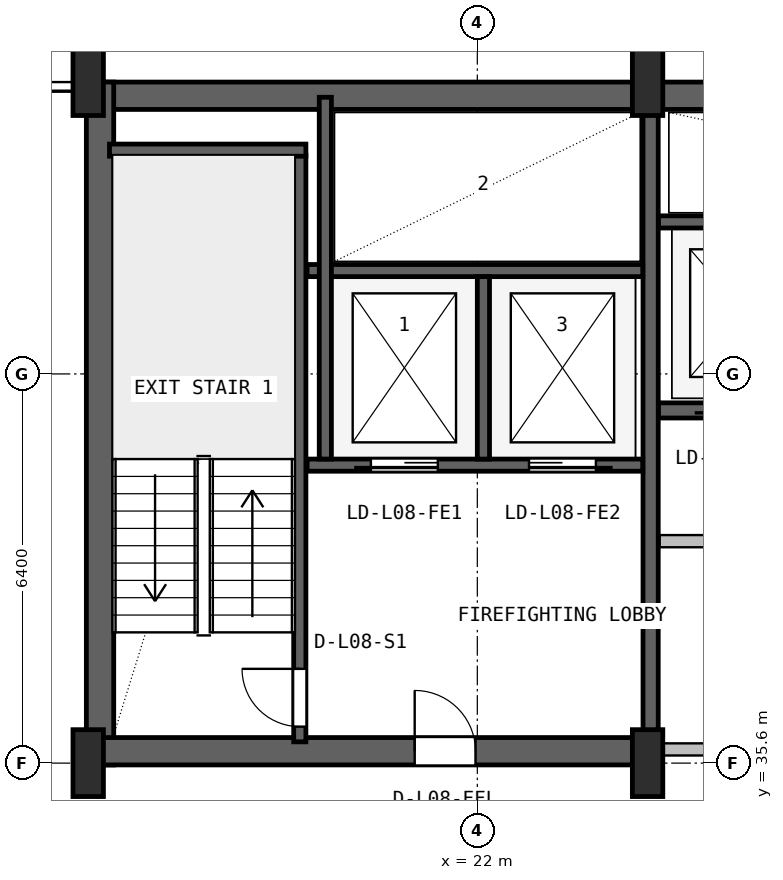
"""IFC4 building model, lengths in metres.
Left out: names, types, materials, properties, quantities, classifications, styles, units other than length and angle.
Written with IfcOpenShell. Run it as: python <this file> out.ifc"""

import sys

from ifc_helpers import new_model, si_unit, direction, frame, frame_2d, origin, origin_2d, place, context, subcontext, project, spatial, rectangle, i_section, extrude, source, transform, mapped, element, fill, save


model = new_model("IFC4")
c1 = context("Model", 3, precision=1e-05, world=origin(), true_north=direction((0.0, 1.0)))
c2 = subcontext(c1, "Body", "Model", "MODEL_VIEW")
j1 = project(units=[si_unit("LENGTHUNIT", "METRE"), si_unit("PLANEANGLEUNIT", "RADIAN")], contexts=[c1])
p1 = place(None, origin())
s1 = spatial("IfcSite", under=j1, at=p1, CompositionType="ELEMENT")
p2 = place(p1, origin())
s2 = spatial("IfcBuilding", under=s1, at=p2, CompositionType="ELEMENT")
p3 = place(p2, frame((0.0, 0.0, 39.3)))
s3 = spatial("IfcBuildingStorey", under=s2, at=p3, CompositionType="ELEMENT", Elevation=39.3)
p4 = place(p3, frame((15.6, 46.575, 0.0), z_axis=(0.0, 0.0, 1.0), x_axis=(1.0, 0.0, 0.0)))
e1 = element("IfcWall", 1, at=p4, inside=s3, PredefinedType="SHEAR", context=c2, shape_type="SweptSolid", body=[
    extrude(rectangle(XDim=36.8, YDim=0.45, at=frame_2d((18.4, 0.0))), origin(), (0.0, 0.0, 1.0), 3.65),
])
p5 = place(p3, frame((15.795, 35.57, 0.0), z_axis=(0.0, 0.0, 1.0), x_axis=(0.0, 1.0, 0.0)))
e2 = element("IfcWall", 2, at=p5, inside=s3, PredefinedType="SHEAR", context=c2, shape_type="SweptSolid", body=[
    extrude(rectangle(XDim=11.23, YDim=0.45, at=frame_2d((5.615, 0.0))), origin(), (0.0, 0.0, 1.0), 3.65),
])
p6 = place(p3, frame((15.57, 35.795, 0.0), z_axis=(0.0, 0.0, 1.0), x_axis=(1.0, 0.0, 0.0)))
e3 = element("IfcWall", 3, at=p6, inside=s3, PredefinedType="SHEAR", context=c2, shape_type="SweptSolid", body=[
    extrude(rectangle(XDim=9.23, YDim=0.45, at=frame_2d((4.615, 0.0))), origin(), (0.0, 0.0, 1.0), 3.65),
])
p7 = place(p6, frame((5.4, 0.0, 0.0)))
e4 = element("IfcOpeningElement", 4, at=p7, cuts=e3, PredefinedType="OPENING", context=c2, shape_type="SweptSolid", body=[
    extrude(rectangle(XDim=1.0, YDim=2.1, at=frame_2d((0.5, 1.05))), frame((0.0, 0.235, 0.0), z_axis=(0.0, -1.0, 0.0), x_axis=(1.0, 0.0, 0.0)), (0.0, 0.0, 1.0), 0.47),
])
m1 = source(origin(), c2, "Body", "SweptSolid", [
    extrude(i_section(OverallWidth=0.5, OverallDepth=1.1, WebThickness=0.018, FlangeThickness=0.032, FilletRadius=0.018, at=origin_2d()), origin(), (0.0, 0.0, 1.0), 3.9),
])
for number, where, z_axis, x_axis in (
    (5, (15.6, 35.6, 0.0), (0.0, 0.0, 1.0), (1.0, 0.0, 0.0)),
    (6, (15.6, 46.8, 0.0), (0.0, 0.0, 1.0), (1.0, 0.0, 0.0)),
    (7, (24.8, 35.6, 0.0), (0.0, 0.0, 1.0), (1.0, 0.0, 0.0)),
    (8, (24.8, 46.8, 0.0), (0.0, 0.0, 1.0), (1.0, 0.0, 0.0)),
):
    element("IfcColumn", number, at=place(p3, frame(where, z_axis=z_axis, x_axis=x_axis)), inside=s3, PredefinedType="COLUMN", context=c2, shape_type="MappedRepresentation", body=[
        mapped(m1, transform((0.0, 0.0, 0.0), x_axis=(1.0, 0.0, 0.0), y_axis=(0.0, 1.0, 0.0), z_axis=(0.0, 0.0, 1.0), scale=1.0)),
    ])
p8 = place(p3, frame((19.08, 35.95, 0.0), z_axis=(0.0, 0.0, 1.0), x_axis=(0.0, 1.0, 0.0)))
e9 = element("IfcWall", 9, at=p8, inside=s3, PredefinedType="SHEAR", context=c2, shape_type="SweptSolid", body=[
    extrude(rectangle(XDim=9.65, YDim=0.2, at=frame_2d((4.825, 0.0))), origin(), (0.0, 0.0, 1.0), 3.65),
])
p9 = place(p8, frame((0.25, 0.0, 0.0)))
e10 = element("IfcOpeningElement", 10, at=p9, cuts=e9, PredefinedType="OPENING", context=c2, shape_type="SweptSolid", body=[
    extrude(rectangle(XDim=0.95, YDim=2.1, at=frame_2d((0.475, 1.05))), frame((0.0, 0.11, 0.0), z_axis=(0.0, -1.0, 0.0), x_axis=(1.0, 0.0, 0.0)), (0.0, 0.0, 1.0), 0.22),
])
p10 = place(p3, frame((15.95, 45.68, 0.0), z_axis=(0.0, 0.0, 1.0), x_axis=(1.0, 0.0, 0.0)))
e11 = element("IfcWall", 11, at=p10, inside=s3, PredefinedType="SHEAR", context=c2, shape_type="SweptSolid", body=[
    extrude(rectangle(XDim=3.23, YDim=0.2, at=frame_2d((1.615, 0.0))), origin(), (0.0, 0.0, 1.0), 3.65),
])
p11 = place(p3, frame((24.85, 36.05, 0.0), z_axis=(0.0, 0.0, 1.0), x_axis=(0.0, 1.0, 0.0)))
e12 = element("IfcWall", 12, at=p11, inside=s3, PredefinedType="SHEAR", context=c2, shape_type="SweptSolid", body=[
    extrude(rectangle(XDim=10.45, YDim=0.25, at=frame_2d((5.225, 0.0))), origin(), (0.0, 0.0, 1.0), 3.65),
])
p12 = place(p3, frame((19.2, 40.5, 0.0), z_axis=(0.0, 0.0, 1.0), x_axis=(1.0, 0.0, 0.0)))
e13 = element("IfcWall", 13, at=p12, inside=s3, PredefinedType="SHEAR", context=c2, shape_type="SweptSolid", body=[
    extrude(rectangle(XDim=5.52, YDim=0.2, at=frame_2d((2.76, 0.0))), origin(), (0.0, 0.0, 1.0), 3.65),
])
p13 = place(p12, frame((1.05, 0.0, 0.0)))
e14 = element("IfcOpeningElement", 14, at=p13, cuts=e13, PredefinedType="OPENING", context=c2, shape_type="SweptSolid", body=[
    extrude(rectangle(XDim=1.1, YDim=2.18, at=frame_2d((0.55, 1.09))), frame((0.0, 0.11, 0.0), z_axis=(0.0, -1.0, 0.0), x_axis=(1.0, 0.0, 0.0)), (0.0, 0.0, 1.0), 0.22),
])
p14 = place(p12, frame((3.65, 0.0, 0.0)))
e15 = element("IfcOpeningElement", 15, at=p14, cuts=e13, PredefinedType="OPENING", context=c2, shape_type="SweptSolid", body=[
    extrude(rectangle(XDim=1.1, YDim=2.18, at=frame_2d((0.55, 1.09))), frame((0.0, 0.11, 0.0), z_axis=(0.0, -1.0, 0.0), x_axis=(1.0, 0.0, 0.0)), (0.0, 0.0, 1.0), 0.22),
])
p15 = place(p3, frame((19.2, 43.7, 0.0), z_axis=(0.0, 0.0, 1.0), x_axis=(1.0, 0.0, 0.0)))
e16 = element("IfcWall", 16, at=p15, inside=s3, PredefinedType="SHEAR", context=c2, shape_type="SweptSolid", body=[
    extrude(rectangle(XDim=5.52, YDim=0.2, at=frame_2d((2.76, 0.0))), origin(), (0.0, 0.0, 1.0), 3.65),
])
p16 = place(p3, frame((22.1, 40.6, 0.0), z_axis=(0.0, 0.0, 1.0), x_axis=(0.0, 1.0, 0.0)))
e17 = element("IfcWall", 17, at=p16, inside=s3, PredefinedType="SHEAR", context=c2, shape_type="SweptSolid", body=[
    extrude(rectangle(XDim=3.0, YDim=0.2, at=frame_2d((1.5, 0.0))), origin(), (0.0, 0.0, 1.0), 3.65),
])
p17 = place(p3, frame((19.5, 40.6, 0.0), z_axis=(0.0, 0.0, 1.0), x_axis=(0.0, 1.0, 0.0)))
e18 = element("IfcWall", 18, at=p17, inside=s3, PredefinedType="SHEAR", context=c2, shape_type="SweptSolid", body=[
    extrude(rectangle(XDim=5.95, YDim=0.2, at=frame_2d((2.975, 0.0))), origin(), (0.0, 0.0, 1.0), 3.65),
])
p18 = place(p3, frame((24.98, 41.4, 0.0), z_axis=(0.0, 0.0, 1.0), x_axis=(1.0, 0.0, 0.0)))
e19 = element("IfcWall", 19, at=p18, inside=s3, PredefinedType="SHEAR", context=c2, shape_type="SweptSolid", body=[
    extrude(rectangle(XDim=23.82, YDim=0.25, at=frame_2d((11.91, 0.0))), origin(), (0.0, 0.0, 1.0), 3.65),
])
p19 = place(p18, frame((0.87, 0.0, 0.0)))
e20 = element("IfcOpeningElement", 20, at=p19, cuts=e19, PredefinedType="OPENING", context=c2, shape_type="SweptSolid", body=[
    extrude(rectangle(XDim=1.1, YDim=2.18, at=frame_2d((0.55, 1.09))), frame((0.0, 0.135, 0.0), z_axis=(0.0, -1.0, 0.0), x_axis=(1.0, 0.0, 0.0)), (0.0, 0.0, 1.0), 0.27),
])
p20 = place(p18, frame((3.47, 0.0, 0.0)))
e21 = element("IfcOpeningElement", 21, at=p20, cuts=e19, PredefinedType="OPENING", context=c2, shape_type="SweptSolid", body=[
    extrude(rectangle(XDim=1.1, YDim=2.18, at=frame_2d((0.55, 1.09))), frame((0.0, 0.135, 0.0), z_axis=(0.0, -1.0, 0.0), x_axis=(1.0, 0.0, 0.0)), (0.0, 0.0, 1.0), 0.27),
])
p21 = place(p18, frame((6.07, 0.0, 0.0)))
e22 = element("IfcOpeningElement", 22, at=p21, cuts=e19, PredefinedType="OPENING", context=c2, shape_type="SweptSolid", body=[
    extrude(rectangle(XDim=1.1, YDim=2.18, at=frame_2d((0.55, 1.09))), frame((0.0, 0.135, 0.0), z_axis=(0.0, -1.0, 0.0), x_axis=(1.0, 0.0, 0.0)), (0.0, 0.0, 1.0), 0.27),
])
p22 = place(p3, frame((24.98, 44.5, 0.0), z_axis=(0.0, 0.0, 1.0), x_axis=(1.0, 0.0, 0.0)))
e23 = element("IfcWall", 23, at=p22, inside=s3, PredefinedType="SHEAR", context=c2, shape_type="SweptSolid", body=[
    extrude(rectangle(XDim=7.87, YDim=0.2, at=frame_2d((3.935, 0.0))), origin(), (0.0, 0.0, 1.0), 3.65),
])
p23 = place(p3, frame((25.0, 35.825, 0.0), z_axis=(0.0, 0.0, 1.0), x_axis=(1.0, 0.0, 0.0)))
e24 = element("IfcWall", 24, at=p23, inside=s3, PredefinedType="PLUMBINGWALL", context=c2, shape_type="SweptSolid", body=[
    extrude(rectangle(XDim=9.75, YDim=0.2, at=frame_2d((4.875, 0.0))), origin(), (0.0, 0.0, 1.0), 2.425),
])
p24 = place(p3, frame((25.0, 39.25, 0.0), z_axis=(0.0, 0.0, 1.0), x_axis=(1.0, 0.0, 0.0)))
e25 = element("IfcWall", 25, at=p24, inside=s3, PredefinedType="PLUMBINGWALL", context=c2, shape_type="SweptSolid", body=[
    extrude(rectangle(XDim=9.75, YDim=0.2, at=frame_2d((4.875, 0.0))), origin(), (0.0, 0.0, 1.0), 3.63),
])
p25 = place(p24, frame((1.75, 0.0, 0.0)))
e26 = element("IfcOpeningElement", 26, at=p25, cuts=e25, PredefinedType="OPENING", context=c2, shape_type="SweptSolid", body=[
    extrude(rectangle(XDim=0.9, YDim=2.06, at=frame_2d((0.45, 1.03))), frame((0.0, 0.11, 0.0), z_axis=(0.0, -1.0, 0.0), x_axis=(1.0, 0.0, 0.0)), (0.0, 0.0, 1.0), 0.22),
])
p26 = place(p24, frame((6.725, 0.0, 0.0)))
e27 = element("IfcOpeningElement", 27, at=p26, cuts=e25, PredefinedType="OPENING", context=c2, shape_type="SweptSolid", body=[
    extrude(rectangle(XDim=0.9, YDim=2.06, at=frame_2d((0.45, 1.03))), frame((0.0, 0.11, 0.0), z_axis=(0.0, -1.0, 0.0), x_axis=(1.0, 0.0, 0.0)), (0.0, 0.0, 1.0), 0.22),
])
m2 = source(origin(), c2, "Body", "SweptSolid", [
    extrude(rectangle(XDim=0.95, YDim=2.1, at=frame_2d((0.475, 1.05))), frame((0.0, 0.025, 0.0), z_axis=(0.0, -1.0, 0.0), x_axis=(1.0, 0.0, 0.0)), (0.0, 0.0, 1.0), 0.05),
])
p27 = place(p9, origin())
e28 = element("IfcDoor", 28, at=p27, inside=s3, OperationType="SINGLE_SWING_RIGHT", PredefinedType="DOOR", context=c2, shape_type="MappedRepresentation", body=[
    mapped(m2, transform((0.0, 0.0, 0.0), x_axis=(1.0, 0.0, 0.0), y_axis=(0.0, 1.0, 0.0), z_axis=(0.0, 0.0, 1.0), scale=1.0)),
])
fill(e10, e28)
m3 = source(origin(), c2, "Body", "SweptSolid", [
    extrude(rectangle(XDim=1.0, YDim=2.1, at=frame_2d((0.5, 1.05))), frame((0.0, 0.025, 0.0), z_axis=(0.0, -1.0, 0.0), x_axis=(1.0, 0.0, 0.0)), (0.0, 0.0, 1.0), 0.05),
])
p28 = place(p7, origin())
e29 = element("IfcDoor", 29, at=p28, inside=s3, OperationType="SINGLE_SWING_LEFT", PredefinedType="DOOR", context=c2, shape_type="MappedRepresentation", body=[
    mapped(m3, transform((0.0, 0.0, 0.0), x_axis=(1.0, 0.0, 0.0), y_axis=(0.0, 1.0, 0.0), z_axis=(0.0, 0.0, 1.0), scale=1.0)),
])
fill(e4, e29)
m4 = source(origin(), c2, "Body", "SweptSolid", [
    extrude(rectangle(XDim=1.1, YDim=2.18, at=frame_2d((0.55, 1.09))), frame((0.0, 0.025, 0.0), z_axis=(0.0, -1.0, 0.0), x_axis=(1.0, 0.0, 0.0)), (0.0, 0.0, 1.0), 0.05),
])
p29 = place(p13, frame((1.1, 0.0, 0.0), z_axis=(0.0, 0.0, 1.0), x_axis=(-1.0, 0.0, 0.0)))
e30 = element("IfcDoor", 30, at=p29, inside=s3, OperationType="SLIDING_TO_LEFT", PredefinedType="DOOR", context=c2, shape_type="MappedRepresentation", body=[
    mapped(m4, transform((0.0, 0.0, 0.0), x_axis=(1.0, 0.0, 0.0), y_axis=(0.0, 1.0, 0.0), z_axis=(0.0, 0.0, 1.0), scale=1.0)),
])
fill(e14, e30)
p30 = place(p14, frame((1.1, 0.0, 0.0), z_axis=(0.0, 0.0, 1.0), x_axis=(-1.0, 0.0, 0.0)))
e31 = element("IfcDoor", 31, at=p30, inside=s3, OperationType="SLIDING_TO_RIGHT", PredefinedType="DOOR", context=c2, shape_type="MappedRepresentation", body=[
    mapped(m4, transform((0.0, 0.0, 0.0), x_axis=(1.0, 0.0, 0.0), y_axis=(0.0, 1.0, 0.0), z_axis=(0.0, 0.0, 1.0), scale=1.0)),
])
fill(e15, e31)
save(model, sys.argv[1])
